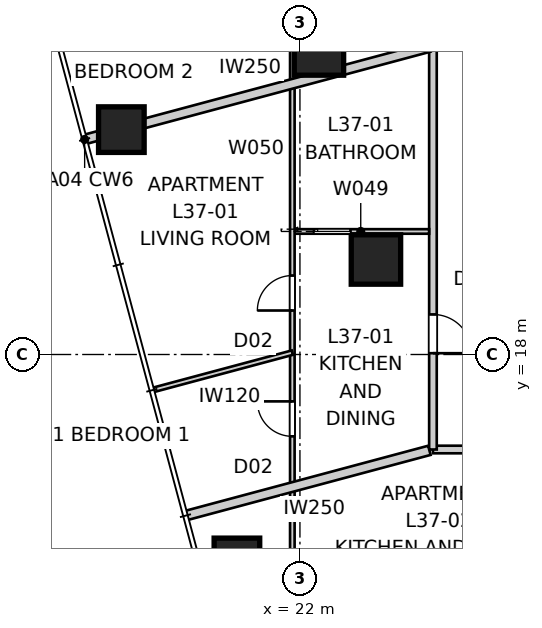
"""IFC4 building model, lengths in metres.
Left out: names, types, materials, properties, quantities, classifications, styles, units other than length and angle.
Written with IfcOpenShell. Run it as: python <this file> out.ifc"""

import sys

from ifc_helpers import new_model, si_unit, direction, frame, frame_2d, origin, origin_2d, place, context, subcontext, project, spatial, rectangle, extrude, element, fill, save


model = new_model("IFC4")
c1 = context("Model", 3, precision=1e-05, world=origin(), true_north=direction((0.0, 1.0)))
c2 = subcontext(c1, "Body", "Model", "MODEL_VIEW")
j1 = project(units=[si_unit("LENGTHUNIT", "METRE"), si_unit("PLANEANGLEUNIT", "RADIAN")], contexts=[c1])
p1 = place(None, origin())
s1 = spatial("IfcSite", under=j1, at=p1, CompositionType="ELEMENT")
p2 = place(p1, origin())
s2 = spatial("IfcBuilding", under=s1, at=p2, CompositionType="ELEMENT")
p3 = place(p2, frame((0.0, 0.0, 135.4)))
s3 = spatial("IfcBuildingStorey", under=s2, at=p3, CompositionType="ELEMENT", Elevation=135.4)
for number, where, z_axis, x_axis in (
    (1, (17.301, 23.918, 0.0), (0.0, 0.0, 1.0), (1.0, 0.0, 0.0)),
    (2, (20.342, 12.568, 0.0), (0.0, 0.0, 1.0), (1.0, 0.0, 0.0)),
):
    element("IfcColumn", number, at=place(p3, frame(where, z_axis=z_axis, x_axis=x_axis)), inside=s3, PredefinedType="COLUMN", context=c2, shape_type="SweptSolid", body=[
        extrude(rectangle(XDim=1.2, YDim=1.2, at=origin_2d()), origin(), (0.0, 0.0, 1.0), 3.2),
    ])
for number, where, z_axis, x_axis in (
    (3, (22.5, 26.0, 0.0), (0.0, 0.0, 1.0), (1.0, 0.0, 0.0)),
    (4, (24.0, 20.5, 0.0), (0.0, 0.0, 1.0), (1.0, 0.0, 0.0)),
):
    element("IfcColumn", number, at=place(p3, frame(where, z_axis=z_axis, x_axis=x_axis)), inside=s3, PredefinedType="COLUMN", context=c2, shape_type="SweptSolid", body=[
        extrude(rectangle(XDim=1.3, YDim=1.3, at=origin_2d()), origin(), (0.0, 0.0, 1.0), 3.4),
    ])
p4 = place(p3, frame((25.5, 15.5, 0.0), z_axis=(0.0, 0.0, 1.0), x_axis=(1.0, 0.0, 0.0)))
e5 = element("IfcWall", 5, at=p4, inside=s3, PredefinedType="PARTITIONING", context=c2, shape_type="SweptSolid", body=[
    extrude(rectangle(XDim=29.0, YDim=0.2, at=frame_2d((14.5, 0.0))), origin(), (0.0, 0.0, 1.0), 3.2),
])
p5 = place(p4, frame((25.146, 0.0, 0.0)))
e6 = element("IfcOpeningElement", 6, at=p5, cuts=e5, PredefinedType="OPENING", context=c2, shape_type="SweptSolid", body=[
    extrude(rectangle(XDim=1.02, YDim=2.0, at=frame_2d((0.51, 1.0))), frame((0.0, 0.11, 0.0), z_axis=(0.0, -1.0, 0.0), x_axis=(1.0, 0.0, 0.0)), (0.0, 0.0, 1.0), 0.22),
])
p6 = place(p4, frame((1.761, 0.0, 0.0)))
e7 = element("IfcOpeningElement", 7, at=p6, cuts=e5, PredefinedType="OPENING", context=c2, shape_type="SweptSolid", body=[
    extrude(rectangle(XDim=1.02, YDim=2.34, at=frame_2d((0.51, 1.17))), frame((0.0, 0.11, 0.0), z_axis=(0.0, -1.0, 0.0), x_axis=(1.0, 0.0, 0.0)), (0.0, 0.0, 1.0), 0.22),
])
p7 = place(p3, frame((25.5, 43.7, 0.0), z_axis=(0.0, 0.0, 1.0), x_axis=(0.0, -1.0, 0.0)))
e8 = element("IfcWall", 8, at=p7, inside=s3, PredefinedType="PARTITIONING", context=c2, shape_type="SweptSolid", body=[
    extrude(rectangle(XDim=28.2, YDim=0.2, at=frame_2d((14.1, 0.0))), origin(), (0.0, 0.0, 1.0), 3.2),
])
p8 = place(p7, frame((24.646, 0.0, 0.0)))
e9 = element("IfcOpeningElement", 9, at=p8, cuts=e8, PredefinedType="OPENING", context=c2, shape_type="SweptSolid", body=[
    extrude(rectangle(XDim=1.02, YDim=2.0, at=frame_2d((0.51, 1.0))), frame((0.0, 0.11, 0.0), z_axis=(0.0, -1.0, 0.0), x_axis=(1.0, 0.0, 0.0)), (0.0, 0.0, 1.0), 0.22),
])
p9 = place(p7, frame((14.858, 0.0, 0.0)))
e10 = element("IfcOpeningElement", 10, at=p9, cuts=e8, PredefinedType="OPENING", context=c2, shape_type="SweptSolid", body=[
    extrude(rectangle(XDim=1.02, YDim=2.34, at=frame_2d((0.51, 1.17))), frame((0.0, 0.11, 0.0), z_axis=(0.0, -1.0, 0.0), x_axis=(1.0, 0.0, 0.0)), (0.0, 0.0, 1.0), 0.22),
])
p10 = place(p7, frame((1.347, 0.0, 0.0)))
e11 = element("IfcOpeningElement", 11, at=p10, cuts=e8, PredefinedType="OPENING", context=c2, shape_type="SweptSolid", body=[
    extrude(rectangle(XDim=1.02, YDim=2.0, at=frame_2d((0.51, 1.0))), frame((0.0, 0.11, 0.0), z_axis=(0.0, -1.0, 0.0), x_axis=(1.0, 0.0, 0.0)), (0.0, 0.0, 1.0), 0.22),
])
p11 = place(p3, frame((16.335, 23.659, 0.0), z_axis=(0.0, 0.0, 1.0), x_axis=(0.965927049013, 0.258814481793, 0.0)))
e12 = element("IfcWall", 12, at=p11, inside=s3, PredefinedType="PARTITIONING", context=c2, shape_type="SweptSolid", body=[
    extrude(rectangle(XDim=9.392, YDim=0.25, at=frame_2d((4.696, 0.0))), origin(), (0.0, 0.0, 1.0), 3.2),
])
p12 = place(p3, frame((18.988, 13.758, 0.0), z_axis=(0.0, 0.0, 1.0), x_axis=(0.965929355837, 0.25880587229, 0.0)))
e13 = element("IfcWall", 13, at=p12, inside=s3, PredefinedType="PARTITIONING", context=c2, shape_type="SweptSolid", body=[
    extrude(rectangle(XDim=6.645, YDim=0.25, at=frame_2d((3.322, 0.0))), origin(), (0.0, 0.0, 1.0), 3.2),
])
p13 = place(p3, frame((21.8, 21.238, 0.0), z_axis=(0.0, 0.0, 1.0), x_axis=(1.0, 0.0, 0.0)))
e14 = element("IfcWall", 14, at=p13, inside=s3, PredefinedType="PARTITIONING", context=c2, shape_type="SweptSolid", body=[
    extrude(rectangle(XDim=3.6, YDim=0.12, at=frame_2d((1.8, 0.0))), origin(), (0.0, 0.0, 1.0), 2.672),
])
p14 = place(p13, frame((0.57, 0.0, 0.0)))
e15 = element("IfcOpeningElement", 15, at=p14, cuts=e14, PredefinedType="OPENING", context=c2, shape_type="SweptSolid", body=[
    extrude(rectangle(XDim=0.96, YDim=2.1, at=frame_2d((0.48, 1.05))), frame((0.0, 0.07, 0.0), z_axis=(0.0, -1.0, 0.0), x_axis=(1.0, 0.0, 0.0)), (0.0, 0.0, 1.0), 0.14),
])
p15 = place(p3, frame((21.8, 11.8, 0.0), z_axis=(0.0, 0.0, 1.0), x_axis=(0.0, 1.0, 0.0)))
e16 = element("IfcWall", 16, at=p15, inside=s3, PredefinedType="PARTITIONING", context=c2, shape_type="SweptSolid", body=[
    extrude(rectangle(XDim=21.116, YDim=0.12, at=frame_2d((10.558, 0.0))), origin(), (0.0, 0.0, 1.0), 3.2),
])
p16 = place(p15, frame((4.046, 0.0, 0.0)))
e17 = element("IfcOpeningElement", 17, at=p16, cuts=e16, PredefinedType="OPENING", context=c2, shape_type="SweptSolid", body=[
    extrude(rectangle(XDim=0.92, YDim=2.34, at=frame_2d((0.46, 1.17))), frame((0.0, 0.07, 0.0), z_axis=(0.0, -1.0, 0.0), x_axis=(1.0, 0.0, 0.0)), (0.0, 0.0, 1.0), 0.14),
])
p17 = place(p15, frame((7.358, 0.0, 0.0)))
e18 = element("IfcOpeningElement", 18, at=p17, cuts=e16, PredefinedType="OPENING", context=c2, shape_type="SweptSolid", body=[
    extrude(rectangle(XDim=0.92, YDim=2.34, at=frame_2d((0.46, 1.17))), frame((0.0, 0.07, 0.0), z_axis=(0.0, -1.0, 0.0), x_axis=(1.0, 0.0, 0.0)), (0.0, 0.0, 1.0), 0.14),
])
p18 = place(p15, frame((14.958, 0.0, 0.0)))
e19 = element("IfcOpeningElement", 19, at=p18, cuts=e16, PredefinedType="OPENING", context=c2, shape_type="SweptSolid", body=[
    extrude(rectangle(XDim=0.92, YDim=2.34, at=frame_2d((0.46, 1.17))), frame((0.0, 0.07, 0.0), z_axis=(0.0, -1.0, 0.0), x_axis=(1.0, 0.0, 0.0)), (0.0, 0.0, 1.0), 0.14),
])
p19 = place(p15, frame((17.31, 0.0, 0.0)))
e20 = element("IfcOpeningElement", 20, at=p19, cuts=e16, PredefinedType="OPENING", context=c2, shape_type="SweptSolid", body=[
    extrude(rectangle(XDim=0.92, YDim=2.34, at=frame_2d((0.46, 1.17))), frame((0.0, 0.07, 0.0), z_axis=(0.0, -1.0, 0.0), x_axis=(1.0, 0.0, 0.0)), (0.0, 0.0, 1.0), 0.14),
])
p20 = place(p3, frame((21.8, 18.049, 0.0), z_axis=(0.0, 0.0, 1.0), x_axis=(-0.965936829447, -0.258777977267, 0.0)))
e21 = element("IfcWall", 21, at=p20, inside=s3, PredefinedType="PARTITIONING", context=c2, shape_type="SweptSolid", body=[
    extrude(rectangle(XDim=3.787, YDim=0.12, at=frame_2d((1.894, 0.0))), origin(), (0.0, 0.0, 1.0), 3.2),
])
p21 = place(p8, origin())
e22 = element("IfcDoor", 22, at=p21, inside=s3, OperationType="SINGLE_SWING_RIGHT", PredefinedType="DOOR", context=c2, shape_type="SweptSolid", body=[
    extrude(rectangle(XDim=1.02, YDim=2.0, at=frame_2d((0.51, 1.0))), frame((0.0, 0.025, 0.0), z_axis=(0.0, -1.0, 0.0), x_axis=(1.0, 0.0, 0.0)), (0.0, 0.0, 1.0), 0.05),
])
fill(e9, e22)
p22 = place(p14, origin())
e23 = element("IfcDoor", 23, at=p22, inside=s3, OperationType="SLIDING_TO_LEFT", PredefinedType="DOOR", context=c2, shape_type="SweptSolid", body=[
    extrude(rectangle(XDim=0.96, YDim=2.1, at=frame_2d((0.48, 1.05))), frame((0.0, 0.025, 0.0), z_axis=(0.0, -1.0, 0.0), x_axis=(1.0, 0.0, 0.0)), (0.0, 0.0, 1.0), 0.05),
])
fill(e15, e23)
p23 = place(p16, origin())
e24 = element("IfcDoor", 24, at=p23, inside=s3, OperationType="SINGLE_SWING_RIGHT", PredefinedType="DOOR", context=c2, shape_type="SweptSolid", body=[
    extrude(rectangle(XDim=0.92, YDim=2.34, at=frame_2d((0.46, 1.17))), frame((0.0, 0.025, 0.0), z_axis=(0.0, -1.0, 0.0), x_axis=(1.0, 0.0, 0.0)), (0.0, 0.0, 1.0), 0.05),
])
fill(e17, e24)
p24 = place(p17, origin())
e25 = element("IfcDoor", 25, at=p24, inside=s3, OperationType="SINGLE_SWING_LEFT", PredefinedType="DOOR", context=c2, shape_type="SweptSolid", body=[
    extrude(rectangle(XDim=0.92, YDim=2.34, at=frame_2d((0.46, 1.17))), frame((0.0, 0.025, 0.0), z_axis=(0.0, -1.0, 0.0), x_axis=(1.0, 0.0, 0.0)), (0.0, 0.0, 1.0), 0.05),
])
fill(e18, e25)
save(model, sys.argv[1])
